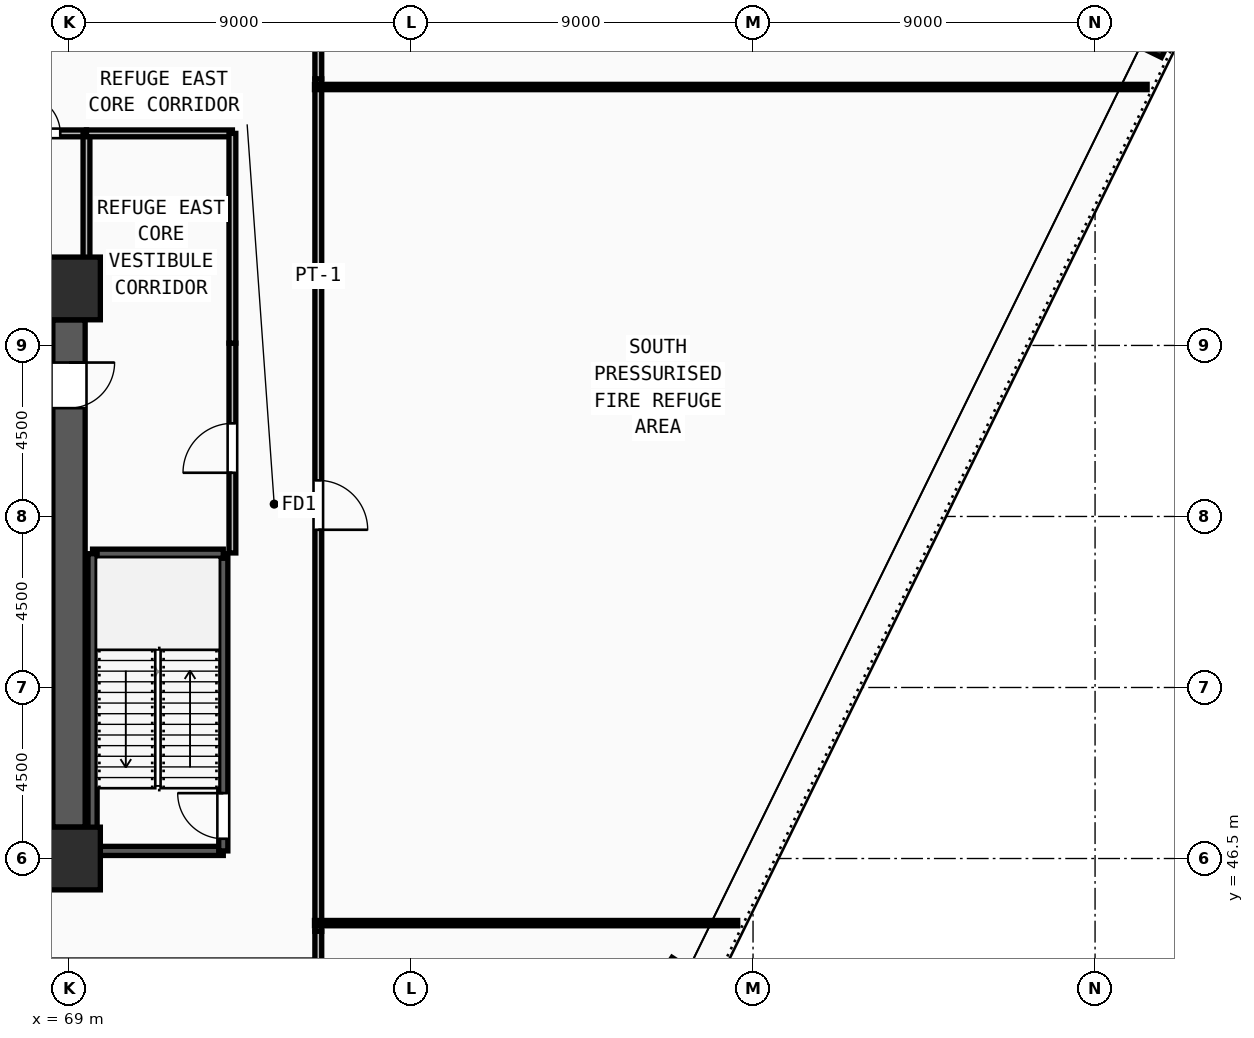
"""IFC4 building model, lengths in metres.
Left out: names, types, materials, properties, quantities, classifications, styles, units other than length and angle.
Written with IfcOpenShell. Run it as: python <this file> out.ifc"""

import sys

from ifc_helpers import new_model, si_unit, direction, frame, frame_2d, origin, origin_2d, place, context, subcontext, project, spatial, rectangle, extrude, source, transform, mapped, element, fill, save


model = new_model("IFC4")
c1 = context("Model", 3, precision=1e-05, world=origin(), true_north=direction((0.0, 1.0)))
c2 = subcontext(c1, "Body", "Model", "MODEL_VIEW")
j1 = project(units=[si_unit("LENGTHUNIT", "METRE"), si_unit("PLANEANGLEUNIT", "RADIAN")], contexts=[c1])
p1 = place(None, origin())
s1 = spatial("IfcSite", under=j1, at=p1, CompositionType="ELEMENT")
p2 = place(p1, origin())
s2 = spatial("IfcBuilding", under=s1, at=p2, CompositionType="ELEMENT")
p3 = place(p2, frame((0.0, 0.0, 93.0)))
s3 = spatial("IfcBuildingStorey", under=s2, at=p3, CompositionType="ELEMENT", Elevation=93.0)
m1 = source(origin(), c2, "Body", "SweptSolid", [
    extrude(rectangle(XDim=1.65, YDim=1.65, at=origin_2d()), origin(), (0.0, 0.0, 1.0), 4.5),
])
for number, where, z_axis, x_axis in (
    (1, (69.0, 46.5, 0.0), (0.0, 0.0, 1.0), (1.0, 0.0, 0.0)),
    (2, (69.0, 61.5, 0.0), (0.0, 0.0, 1.0), (1.0, 0.0, 0.0)),
):
    element("IfcColumn", number, at=place(p3, frame(where, z_axis=z_axis, x_axis=x_axis)), inside=s3, PredefinedType="COLUMN", context=c2, shape_type="MappedRepresentation", body=[
        mapped(m1, transform((0.0, 0.0, 0.0), x_axis=(1.0, 0.0, 0.0), y_axis=(0.0, 1.0, 0.0), z_axis=(0.0, 0.0, 1.0), scale=1.0)),
    ])
m2 = source(origin(), c2, "Body", "SweptSolid", [
    extrude(rectangle(XDim=1.55, YDim=1.25, at=origin_2d()), origin(), (0.0, 0.0, 1.0), 4.5),
])
for number, where, z_axis, x_axis in (
    (3, (97.525, 68.55, 0.0), (0.0, 0.0, 1.0), (0.44, 0.898, 0.0)),
    (4, (84.967, 42.907, 0.0), (0.0, 0.0, 1.0), (0.548, 0.836, 0.0)),
):
    element("IfcColumn", number, at=place(p3, frame(where, z_axis=z_axis, x_axis=x_axis)), inside=s3, PredefinedType="COLUMN", context=c2, shape_type="MappedRepresentation", body=[
        mapped(m2, transform((0.0, 0.0, 0.0), x_axis=(1.0, 0.0, 0.0), y_axis=(0.0, 1.0, 0.0), z_axis=(0.0, 0.0, 1.0), scale=1.0)),
    ])
p4 = place(p3, frame((69.0, 60.675, 0.0), z_axis=(0.0, 0.0, 1.0), x_axis=(0.0, -1.0, 0.0)))
e5 = element("IfcWall", 5, at=p4, inside=s3, PredefinedType="SHEAR", context=c2, shape_type="SweptSolid", body=[
    extrude(rectangle(XDim=13.35, YDim=0.85, at=frame_2d((6.675, 0.0))), origin(), (0.0, 0.0, 1.0), 4.22),
])
m3 = source(origin(), c2, "Body", "SweptSolid", [
    extrude(rectangle(XDim=1.2, YDim=2.2, at=frame_2d((0.6, 1.1))), frame((0.0, 0.435, 0.0), z_axis=(0.0, -1.0, 0.0), x_axis=(1.0, 0.0, 0.0)), (0.0, 0.0, 1.0), 0.87),
])
p5 = place(p4, frame((1.125, 0.0, 0.0)))
e6 = element("IfcOpeningElement", 6, at=p5, cuts=e5, PredefinedType="OPENING", context=c2, shape_type="MappedRepresentation", body=[
    mapped(m3, transform((0.0, 0.0, 0.0), x_axis=(1.0, 0.0, 0.0), y_axis=(0.0, 1.0, 0.0), z_axis=(0.0, 0.0, 1.0), scale=1.0)),
])
p6 = place(p3, frame((69.62, 46.7, 0.0), z_axis=(0.0, 0.0, 1.0), x_axis=(1.0, 0.0, 0.0)))
e7 = element("IfcWall", 7, at=p6, inside=s3, PredefinedType="SOLIDWALL", context=c2, shape_type="SweptSolid", body=[
    extrude(rectangle(XDim=3.44, YDim=0.24, at=frame_2d((1.72, 0.0))), origin(), (0.0, 0.0, 1.0), 4.22),
])
p7 = place(p3, frame((73.06, 46.7, 0.0), z_axis=(0.0, 0.0, 1.0), x_axis=(0.0, 1.0, 0.0)))
e8 = element("IfcWall", 8, at=p7, inside=s3, PredefinedType="SOLIDWALL", context=c2, shape_type="SweptSolid", body=[
    extrude(rectangle(XDim=7.82, YDim=0.24, at=frame_2d((3.91, 0.0))), origin(), (0.0, 0.0, 1.0), 4.22),
])
m4 = source(origin(), c2, "Body", "SweptSolid", [
    extrude(rectangle(XDim=1.2, YDim=2.2, at=frame_2d((0.6, 1.1))), frame((0.0, 0.13, 0.0), z_axis=(0.0, -1.0, 0.0), x_axis=(1.0, 0.0, 0.0)), (0.0, 0.0, 1.0), 0.26),
])
p8 = place(p7, frame((0.32, 0.0, 0.0)))
e9 = element("IfcOpeningElement", 9, at=p8, cuts=e8, PredefinedType="OPENING", context=c2, shape_type="MappedRepresentation", body=[
    mapped(m4, transform((0.0, 0.0, 0.0), x_axis=(1.0, 0.0, 0.0), y_axis=(0.0, 1.0, 0.0), z_axis=(0.0, 0.0, 1.0), scale=1.0)),
])
p9 = place(p3, frame((73.06, 54.52, 0.0), z_axis=(0.0, 0.0, 1.0), x_axis=(-1.0, 0.0, 0.0)))
e10 = element("IfcWall", 10, at=p9, inside=s3, PredefinedType="SOLIDWALL", context=c2, shape_type="SweptSolid", body=[
    extrude(rectangle(XDim=3.44, YDim=0.24, at=frame_2d((1.72, 0.0))), origin(), (0.0, 0.0, 1.0), 4.22),
])
p10 = place(p3, frame((69.62, 54.52, 0.0), z_axis=(0.0, 0.0, 1.0), x_axis=(0.0, -1.0, 0.0)))
e11 = element("IfcWall", 11, at=p10, inside=s3, PredefinedType="SOLIDWALL", context=c2, shape_type="SweptSolid", body=[
    extrude(rectangle(XDim=7.82, YDim=0.24, at=frame_2d((3.91, 0.0))), origin(), (0.0, 0.0, 1.0), 4.22),
])
p11 = place(p3, frame((67.08, 65.58, 0.0), z_axis=(0.0, 0.0, 1.0), x_axis=(1.0, 0.0, 0.0)))
e12 = element("IfcWall", 12, at=p11, inside=s3, PredefinedType="PARTITIONING", context=c2, shape_type="SweptSolid", body=[
    extrude(rectangle(XDim=2.38, YDim=0.18, at=frame_2d((1.19, 0.0))), origin(), (0.0, 0.0, 1.0), 4.22),
])
m5 = source(origin(), c2, "Body", "SweptSolid", [
    extrude(rectangle(XDim=1.0, YDim=2.2, at=frame_2d((0.5, 1.1))), frame((0.0, 0.1, 0.0), z_axis=(0.0, -1.0, 0.0), x_axis=(1.0, 0.0, 0.0)), (0.0, 0.0, 1.0), 0.2),
])
p12 = place(p11, frame((0.69, 0.0, 0.0)))
e13 = element("IfcOpeningElement", 13, at=p12, cuts=e12, PredefinedType="OPENING", context=c2, shape_type="MappedRepresentation", body=[
    mapped(m5, transform((0.0, 0.0, 0.0), x_axis=(1.0, 0.0, 0.0), y_axis=(0.0, 1.0, 0.0), z_axis=(0.0, 0.0, 1.0), scale=1.0)),
])
p13 = place(p3, frame((73.3, 54.54, 0.0), z_axis=(0.0, 0.0, 1.0), x_axis=(0.0, 1.0, 0.0)))
e14 = element("IfcWall", 14, at=p13, inside=s3, PredefinedType="PARTITIONING", context=c2, shape_type="SweptSolid", body=[
    extrude(rectangle(XDim=5.52, YDim=0.18, at=frame_2d((2.76, 0.0))), origin(), (0.0, 0.0, 1.0), 4.22),
])
m6 = source(origin(), c2, "Body", "SweptSolid", [
    extrude(rectangle(XDim=1.3, YDim=2.2, at=frame_2d((0.65, 1.1))), frame((0.0, 0.1, 0.0), z_axis=(0.0, -1.0, 0.0), x_axis=(1.0, 0.0, 0.0)), (0.0, 0.0, 1.0), 0.2),
])
p14 = place(p13, frame((2.11, 0.0, 0.0)))
e15 = element("IfcOpeningElement", 15, at=p14, cuts=e14, PredefinedType="OPENING", context=c2, shape_type="MappedRepresentation", body=[
    mapped(m6, transform((0.0, 0.0, 0.0), x_axis=(1.0, 0.0, 0.0), y_axis=(0.0, 1.0, 0.0), z_axis=(0.0, 0.0, 1.0), scale=1.0)),
])
p15 = place(p3, frame((75.56, 67.015, 0.0), z_axis=(0.0, 0.0, 1.0), x_axis=(0.0, -1.0, 0.0)))
e16 = element("IfcWall", 16, at=p15, inside=s3, PredefinedType="PARTITIONING", context=c2, shape_type="SweptSolid", body=[
    extrude(rectangle(XDim=22.43, YDim=0.18, at=frame_2d((11.215, 0.0))), origin(), (0.0, 0.0, 1.0), 4.22),
])
p16 = place(p15, frame((10.565, 0.0, 0.0)))
e17 = element("IfcOpeningElement", 17, at=p16, cuts=e16, PredefinedType="OPENING", context=c2, shape_type="MappedRepresentation", body=[
    mapped(m6, transform((0.0, 0.0, 0.0), x_axis=(1.0, 0.0, 0.0), y_axis=(0.0, 1.0, 0.0), z_axis=(0.0, 0.0, 1.0), scale=1.0)),
])
p17 = place(p3, frame((69.46, 61.95, 0.0), z_axis=(0.0, 0.0, 1.0), x_axis=(0.0, 1.0, 0.0)))
e18 = element("IfcWall", 18, at=p17, inside=s3, PredefinedType="PARTITIONING", context=c2, shape_type="SweptSolid", body=[
    extrude(rectangle(XDim=3.63, YDim=0.18, at=frame_2d((1.815, 0.0))), origin(), (0.0, 0.0, 1.0), 4.22),
])
p18 = place(p3, frame((69.46, 65.58, 0.0), z_axis=(0.0, 0.0, 1.0), x_axis=(1.0, 0.0, 0.0)))
e19 = element("IfcWall", 19, at=p18, inside=s3, PredefinedType="PARTITIONING", context=c2, shape_type="SweptSolid", body=[
    extrude(rectangle(XDim=3.84, YDim=0.18, at=frame_2d((1.92, 0.0))), origin(), (0.0, 0.0, 1.0), 4.22),
])
p19 = place(p3, frame((73.3, 60.06, 0.0), z_axis=(0.0, 0.0, 1.0), x_axis=(0.0, 1.0, 0.0)))
e20 = element("IfcWall", 20, at=p19, inside=s3, PredefinedType="PARTITIONING", context=c2, shape_type="SweptSolid", body=[
    extrude(rectangle(XDim=5.52, YDim=0.18, at=frame_2d((2.76, 0.0))), origin(), (0.0, 0.0, 1.0), 4.22),
])
p20 = place(p3, frame((75.56, 67.98, 0.0), z_axis=(0.0, 0.0, 1.0), x_axis=(0.0, -1.0, 0.0)))
e21 = element("IfcWall", 21, at=p20, inside=s3, PredefinedType="PARTITIONING", context=c2, shape_type="SweptSolid", body=[
    extrude(rectangle(XDim=0.965, YDim=0.18, at=frame_2d((0.482, 0.0))), origin(), (0.0, 0.0, 1.0), 4.22),
])
p21 = place(p3, frame((75.56, 44.585, 0.0), z_axis=(0.0, 0.0, 1.0), x_axis=(0.0, -1.0, 0.0)))
e22 = element("IfcWall", 22, at=p21, inside=s3, PredefinedType="PARTITIONING", context=c2, shape_type="SweptSolid", body=[
    extrude(rectangle(XDim=0.915, YDim=0.18, at=frame_2d((0.458, 0.0))), origin(), (0.0, 0.0, 1.0), 4.22),
])
p22 = place(p3, frame((75.46, 44.8, 0.0), z_axis=(0.0, 0.0, 1.0), x_axis=(1.0, 0.0, 0.0)))
e23 = element("IfcWall", 23, at=p22, inside=s3, PredefinedType="PARTITIONING", context=c2, shape_type="SweptSolid", body=[
    extrude(rectangle(XDim=11.136, YDim=0.14, at=frame_2d((5.568, 0.0))), origin(), (0.0, 0.0, 1.0), 3.355),
])
p23 = place(p3, frame((75.46, 66.8, 0.0), z_axis=(0.0, 0.0, 1.0), x_axis=(1.0, 0.0, 0.0)))
e24 = element("IfcWall", 24, at=p23, inside=s3, PredefinedType="PARTITIONING", context=c2, shape_type="SweptSolid", body=[
    extrude(rectangle(XDim=21.91, YDim=0.14, at=frame_2d((10.955, 0.0))), origin(), (0.0, 0.0, 1.0), 3.305),
])
m7 = source(origin(), c2, "Body", "SweptSolid", [
    extrude(rectangle(XDim=1.2, YDim=2.2, at=frame_2d((0.6, 1.1))), frame((0.0, 0.025, 0.0), z_axis=(0.0, -1.0, 0.0), x_axis=(1.0, 0.0, 0.0)), (0.0, 0.0, 1.0), 0.05),
])
p24 = place(p5, origin())
e25 = element("IfcDoor", 25, at=p24, inside=s3, OperationType="SINGLE_SWING_LEFT", PredefinedType="DOOR", context=c2, shape_type="MappedRepresentation", body=[
    mapped(m7, transform((0.0, 0.0, 0.0), x_axis=(1.0, 0.0, 0.0), y_axis=(0.0, 1.0, 0.0), z_axis=(0.0, 0.0, 1.0), scale=1.0)),
])
fill(e6, e25)
p25 = place(p8, origin())
e26 = element("IfcDoor", 26, at=p25, inside=s3, OperationType="SINGLE_SWING_RIGHT", PredefinedType="DOOR", context=c2, shape_type="MappedRepresentation", body=[
    mapped(m7, transform((0.0, 0.0, 0.0), x_axis=(1.0, 0.0, 0.0), y_axis=(0.0, 1.0, 0.0), z_axis=(0.0, 0.0, 1.0), scale=1.0)),
])
fill(e9, e26)
m8 = source(origin(), c2, "Body", "SweptSolid", [
    extrude(rectangle(XDim=1.0, YDim=2.2, at=frame_2d((0.5, 1.1))), frame((0.0, 0.025, 0.0), z_axis=(0.0, -1.0, 0.0), x_axis=(1.0, 0.0, 0.0)), (0.0, 0.0, 1.0), 0.05),
])
p26 = place(p12, origin())
e27 = element("IfcDoor", 27, at=p26, inside=s3, OperationType="SINGLE_SWING_LEFT", PredefinedType="DOOR", context=c2, shape_type="MappedRepresentation", body=[
    mapped(m8, transform((0.0, 0.0, 0.0), x_axis=(1.0, 0.0, 0.0), y_axis=(0.0, 1.0, 0.0), z_axis=(0.0, 0.0, 1.0), scale=1.0)),
])
fill(e13, e27)
m9 = source(origin(), c2, "Body", "SweptSolid", [
    extrude(rectangle(XDim=1.3, YDim=2.2, at=frame_2d((0.65, 1.1))), frame((0.0, 0.025, 0.0), z_axis=(0.0, -1.0, 0.0), x_axis=(1.0, 0.0, 0.0)), (0.0, 0.0, 1.0), 0.05),
])
p27 = place(p14, origin())
e28 = element("IfcDoor", 28, at=p27, inside=s3, OperationType="SINGLE_SWING_LEFT", PredefinedType="DOOR", context=c2, shape_type="MappedRepresentation", body=[
    mapped(m9, transform((0.0, 0.0, 0.0), x_axis=(1.0, 0.0, 0.0), y_axis=(0.0, 1.0, 0.0), z_axis=(0.0, 0.0, 1.0), scale=1.0)),
])
fill(e15, e28)
p28 = place(p16, origin())
e29 = element("IfcDoor", 29, at=p28, inside=s3, OperationType="SINGLE_SWING_RIGHT", PredefinedType="DOOR", context=c2, shape_type="MappedRepresentation", body=[
    mapped(m9, transform((0.0, 0.0, 0.0), x_axis=(1.0, 0.0, 0.0), y_axis=(0.0, 1.0, 0.0), z_axis=(0.0, 0.0, 1.0), scale=1.0)),
])
fill(e17, e29)
save(model, sys.argv[1])
